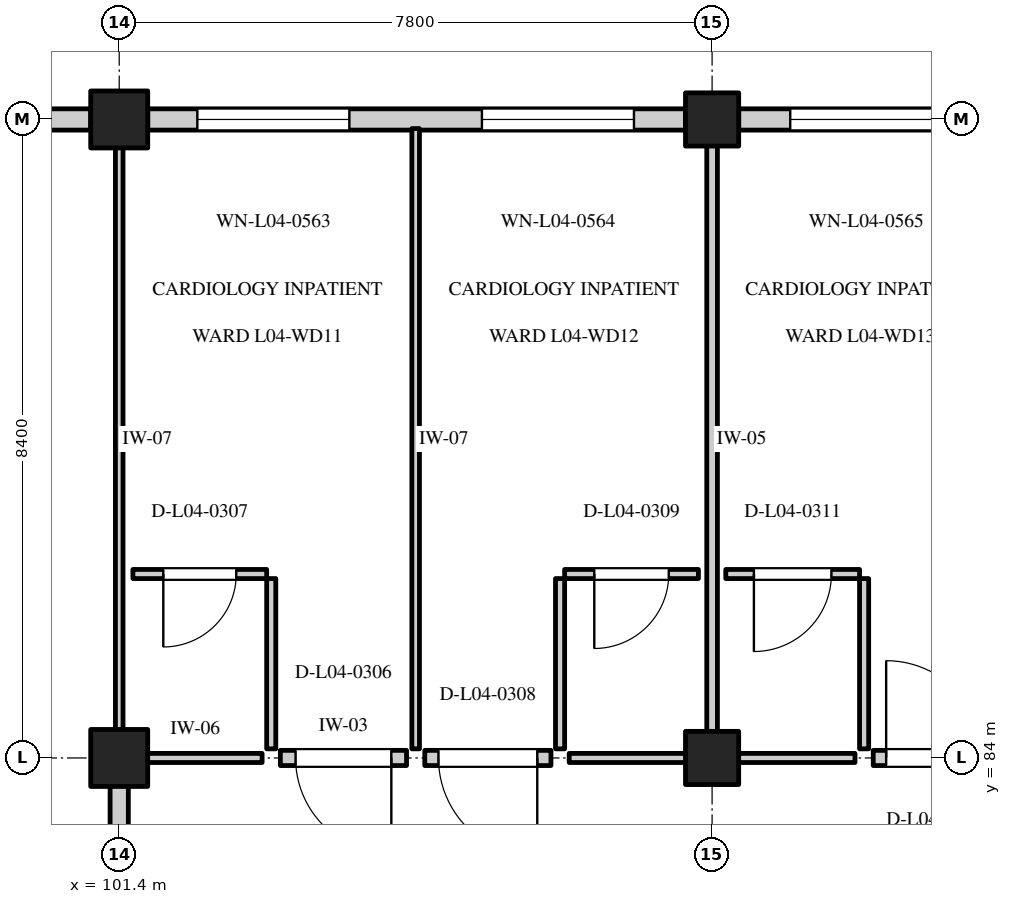
"""IFC4 building model, lengths in metres.
Left out: names, types, materials, properties, quantities, classifications, styles, units other than length and angle.
Written with IfcOpenShell. Run it as: python <this file> out.ifc"""

import sys

from ifc_helpers import new_model, si_unit, direction, frame, frame_2d, origin, origin_2d, place, context, subcontext, project, spatial, rectangle, extrude, element, fill, save


model = new_model("IFC4")
c1 = context("Model", 3, precision=1e-05, world=origin(), true_north=direction((0.0, 1.0)))
c2 = subcontext(c1, "Body", "Model", "MODEL_VIEW")
j1 = project(units=[si_unit("LENGTHUNIT", "METRE"), si_unit("PLANEANGLEUNIT", "RADIAN")], contexts=[c1])
p1 = place(None, origin())
s1 = spatial("IfcSite", under=j1, at=p1, CompositionType="ELEMENT")
p2 = place(p1, origin())
s2 = spatial("IfcBuilding", under=s1, at=p2, CompositionType="ELEMENT")
p3 = place(p2, frame((0.0, 0.0, 18.0)))
s3 = spatial("IfcBuildingStorey", under=s2, at=p3, CompositionType="ELEMENT", Elevation=18.0)
for number, where, z_axis, x_axis in (
    (1, (101.4, 84.0, 0.0), (0.0, 0.0, 1.0), (1.0, 0.0, 0.0)),
    (2, (101.4, 92.4, 0.0), (0.0, 0.0, 1.0), (1.0, 0.0, 0.0)),
):
    element("IfcColumn", number, at=place(p3, frame(where, z_axis=z_axis, x_axis=x_axis)), inside=s3, PredefinedType="COLUMN", context=c2, shape_type="SweptSolid", body=[
        extrude(rectangle(XDim=0.75, YDim=0.75, at=origin_2d()), origin(), (0.0, 0.0, 1.0), 4.2),
    ])
for number, where, z_axis, x_axis in (
    (3, (109.2, 84.0, 0.0), (0.0, 0.0, 1.0), (1.0, 0.0, 0.0)),
    (4, (109.2, 92.4, 0.0), (0.0, 0.0, 1.0), (1.0, 0.0, 0.0)),
):
    element("IfcColumn", number, at=place(p3, frame(where, z_axis=z_axis, x_axis=x_axis)), inside=s3, PredefinedType="COLUMN", context=c2, shape_type="SweptSolid", body=[
        extrude(rectangle(XDim=0.7, YDim=0.7, at=origin_2d()), origin(), (0.0, 0.0, 1.0), 4.2),
    ])
p4 = place(p3, frame((93.95, 92.4, 0.0), z_axis=(0.0, 0.0, 1.0), x_axis=(1.0, 0.0, 0.0)))
e5 = element("IfcWall", 5, at=p4, inside=s3, PredefinedType="STANDARD", context=c2, shape_type="SweptSolid", body=[
    extrude(rectangle(XDim=7.075, YDim=0.28, at=frame_2d((3.538, 0.0))), origin(), (0.0, 0.0, 1.0), 3.335),
])
p5 = place(p4, frame((0.678, 0.0, 0.8)))
e6 = element("IfcOpeningElement", 6, at=p5, cuts=e5, PredefinedType="OPENING", context=c2, shape_type="SweptSolid", body=[
    extrude(rectangle(XDim=2.0, YDim=1.75, at=frame_2d((1.0, 0.875))), frame((0.0, 0.152, 0.0), z_axis=(0.0, -1.0, 0.0), x_axis=(1.0, 0.0, 0.0)), (0.0, 0.0, 1.0), 0.304),
])
p6 = place(p4, frame((4.422, 0.0, 0.8)))
e7 = element("IfcOpeningElement", 7, at=p6, cuts=e5, PredefinedType="OPENING", context=c2, shape_type="SweptSolid", body=[
    extrude(rectangle(XDim=2.0, YDim=1.75, at=frame_2d((1.0, 0.875))), frame((0.0, 0.152, 0.0), z_axis=(0.0, -1.0, 0.0), x_axis=(1.0, 0.0, 0.0)), (0.0, 0.0, 1.0), 0.304),
])
p7 = place(p3, frame((101.775, 92.4, 0.0), z_axis=(0.0, 0.0, 1.0), x_axis=(1.0, 0.0, 0.0)))
e8 = element("IfcWall", 8, at=p7, inside=s3, PredefinedType="STANDARD", context=c2, shape_type="SweptSolid", body=[
    extrude(rectangle(XDim=7.075, YDim=0.28, at=frame_2d((3.538, 0.0))), origin(), (0.0, 0.0, 1.0), 3.335),
])
p8 = place(p7, frame((0.653, 0.0, 0.8)))
e9 = element("IfcOpeningElement", 9, at=p8, cuts=e8, PredefinedType="OPENING", context=c2, shape_type="SweptSolid", body=[
    extrude(rectangle(XDim=2.0, YDim=1.65, at=frame_2d((1.0, 0.825))), frame((0.0, 0.152, 0.0), z_axis=(0.0, -1.0, 0.0), x_axis=(1.0, 0.0, 0.0)), (0.0, 0.0, 1.0), 0.304),
])
p9 = place(p7, frame((4.397, 0.0, 0.8)))
e10 = element("IfcOpeningElement", 10, at=p9, cuts=e8, PredefinedType="OPENING", context=c2, shape_type="SweptSolid", body=[
    extrude(rectangle(XDim=2.0, YDim=1.65, at=frame_2d((1.0, 0.825))), frame((0.0, 0.152, 0.0), z_axis=(0.0, -1.0, 0.0), x_axis=(1.0, 0.0, 0.0)), (0.0, 0.0, 1.0), 0.304),
])
p10 = place(p3, frame((109.55, 92.4, 0.0), z_axis=(0.0, 0.0, 1.0), x_axis=(1.0, 0.0, 0.0)))
e11 = element("IfcWall", 11, at=p10, inside=s3, PredefinedType="STANDARD", context=c2, shape_type="SweptSolid", body=[
    extrude(rectangle(XDim=7.1, YDim=0.28, at=frame_2d((3.55, 0.0))), origin(), (0.0, 0.0, 1.0), 3.335),
])
p11 = place(p10, frame((0.678, 0.0, 0.8)))
e12 = element("IfcOpeningElement", 12, at=p11, cuts=e11, PredefinedType="OPENING", context=c2, shape_type="SweptSolid", body=[
    extrude(rectangle(XDim=2.0, YDim=1.55, at=frame_2d((1.0, 0.775))), frame((0.0, 0.152, 0.0), z_axis=(0.0, -1.0, 0.0), x_axis=(1.0, 0.0, 0.0)), (0.0, 0.0, 1.0), 0.304),
])
p12 = place(p10, frame((4.422, 0.0, 0.8)))
e13 = element("IfcOpeningElement", 13, at=p12, cuts=e11, PredefinedType="OPENING", context=c2, shape_type="SweptSolid", body=[
    extrude(rectangle(XDim=2.0, YDim=1.55, at=frame_2d((1.0, 0.775))), frame((0.0, 0.152, 0.0), z_axis=(0.0, -1.0, 0.0), x_axis=(1.0, 0.0, 0.0)), (0.0, 0.0, 1.0), 0.304),
])
p13 = place(p3, frame((101.4, 84.12, 0.0), z_axis=(0.0, 0.0, 1.0), x_axis=(0.0, 1.0, 0.0)))
e14 = element("IfcWall", 14, at=p13, inside=s3, PredefinedType="PARTITIONING", context=c2, shape_type="SweptSolid", body=[
    extrude(rectangle(XDim=8.16, YDim=0.1, at=frame_2d((4.08, 0.0))), origin(), (0.0, 0.0, 1.0), 3.235),
])
p14 = place(p3, frame((105.3, 84.12, 0.0), z_axis=(0.0, 0.0, 1.0), x_axis=(0.0, 1.0, 0.0)))
e15 = element("IfcWall", 15, at=p14, inside=s3, PredefinedType="PARTITIONING", context=c2, shape_type="SweptSolid", body=[
    extrude(rectangle(XDim=8.16, YDim=0.1, at=frame_2d((4.08, 0.0))), origin(), (0.0, 0.0, 1.0), 3.865),
])
p15 = place(p3, frame((103.52, 84.0, 0.0), z_axis=(0.0, 0.0, 1.0), x_axis=(1.0, 0.0, 0.0)))
e16 = element("IfcWall", 16, at=p15, inside=s3, PredefinedType="STANDARD", context=c2, shape_type="SweptSolid", body=[
    extrude(rectangle(XDim=1.66, YDim=0.2, at=frame_2d((0.83, 0.0))), origin(), (0.0, 0.0, 1.0), 3.235),
])
p16 = place(p15, frame((0.2, 0.0, 0.0)))
e17 = element("IfcOpeningElement", 17, at=p16, cuts=e16, PredefinedType="OPENING", context=c2, shape_type="SweptSolid", body=[
    extrude(rectangle(XDim=1.26, YDim=2.1, at=frame_2d((0.63, 1.05))), frame((0.0, 0.112, 0.0), z_axis=(0.0, -1.0, 0.0), x_axis=(1.0, 0.0, 0.0)), (0.0, 0.0, 1.0), 0.224),
])
p17 = place(p3, frame((101.52, 84.0, 0.0), z_axis=(0.0, 0.0, 1.0), x_axis=(1.0, 0.0, 0.0)))
e18 = element("IfcWall", 18, at=p17, inside=s3, PredefinedType="PARTITIONING", context=c2, shape_type="SweptSolid", body=[
    extrude(rectangle(XDim=1.76, YDim=0.12, at=frame_2d((0.88, 0.0))), origin(), (0.0, 0.0, 1.0), 3.235),
])
p18 = place(p3, frame((103.4, 84.12, 0.0), z_axis=(0.0, 0.0, 1.0), x_axis=(0.0, 1.0, 0.0)))
e19 = element("IfcWall", 19, at=p18, inside=s3, PredefinedType="PARTITIONING", context=c2, shape_type="SweptSolid", body=[
    extrude(rectangle(XDim=2.24, YDim=0.12, at=frame_2d((1.12, 0.0))), origin(), (0.0, 0.0, 1.0), 3.865),
])
p19 = place(p3, frame((101.58, 86.42, 0.0), z_axis=(0.0, 0.0, 1.0), x_axis=(1.0, 0.0, 0.0)))
e20 = element("IfcWall", 20, at=p19, inside=s3, PredefinedType="PARTITIONING", context=c2, shape_type="SweptSolid", body=[
    extrude(rectangle(XDim=1.76, YDim=0.12, at=frame_2d((0.88, 0.0))), origin(), (0.0, 0.0, 1.0), 3.865),
])
p20 = place(p19, frame((0.4, 0.0, 0.0)))
e21 = element("IfcOpeningElement", 21, at=p20, cuts=e20, PredefinedType="OPENING", context=c2, shape_type="SweptSolid", body=[
    extrude(rectangle(XDim=0.96, YDim=2.12, at=frame_2d((0.48, 1.06))), frame((0.0, 0.072, 0.0), z_axis=(0.0, -1.0, 0.0), x_axis=(1.0, 0.0, 0.0)), (0.0, 0.0, 1.0), 0.144),
])
p21 = place(p3, frame((109.2, 84.12, 0.0), z_axis=(0.0, 0.0, 1.0), x_axis=(0.0, 1.0, 0.0)))
e22 = element("IfcWall", 22, at=p21, inside=s3, PredefinedType="PARTITIONING", context=c2, shape_type="SweptSolid", body=[
    extrude(rectangle(XDim=8.16, YDim=0.14, at=frame_2d((4.08, 0.0))), origin(), (0.0, 0.0, 1.0), 3.865),
])
p22 = place(p3, frame((105.42, 84.0, 0.0), z_axis=(0.0, 0.0, 1.0), x_axis=(1.0, 0.0, 0.0)))
e23 = element("IfcWall", 23, at=p22, inside=s3, PredefinedType="STANDARD", context=c2, shape_type="SweptSolid", body=[
    extrude(rectangle(XDim=1.66, YDim=0.2, at=frame_2d((0.83, 0.0))), origin(), (0.0, 0.0, 1.0), 3.235),
])
p23 = place(p22, frame((0.18, 0.0, 0.0)))
e24 = element("IfcOpeningElement", 24, at=p23, cuts=e23, PredefinedType="OPENING", context=c2, shape_type="SweptSolid", body=[
    extrude(rectangle(XDim=1.3, YDim=2.15, at=frame_2d((0.65, 1.075))), frame((0.0, 0.112, 0.0), z_axis=(0.0, -1.0, 0.0), x_axis=(1.0, 0.0, 0.0)), (0.0, 0.0, 1.0), 0.224),
])
p24 = place(p3, frame((107.32, 84.0, 0.0), z_axis=(0.0, 0.0, 1.0), x_axis=(1.0, 0.0, 0.0)))
e25 = element("IfcWall", 25, at=p24, inside=s3, PredefinedType="PARTITIONING", context=c2, shape_type="SweptSolid", body=[
    extrude(rectangle(XDim=1.76, YDim=0.12, at=frame_2d((0.88, 0.0))), origin(), (0.0, 0.0, 1.0), 3.235),
])
p25 = place(p3, frame((107.2, 84.12, 0.0), z_axis=(0.0, 0.0, 1.0), x_axis=(0.0, 1.0, 0.0)))
e26 = element("IfcWall", 26, at=p25, inside=s3, PredefinedType="PARTITIONING", context=c2, shape_type="SweptSolid", body=[
    extrude(rectangle(XDim=2.24, YDim=0.12, at=frame_2d((1.12, 0.0))), origin(), (0.0, 0.0, 1.0), 3.865),
])
p26 = place(p3, frame((107.26, 86.42, 0.0), z_axis=(0.0, 0.0, 1.0), x_axis=(1.0, 0.0, 0.0)))
e27 = element("IfcWall", 27, at=p26, inside=s3, PredefinedType="PARTITIONING", context=c2, shape_type="SweptSolid", body=[
    extrude(rectangle(XDim=1.76, YDim=0.12, at=frame_2d((0.88, 0.0))), origin(), (0.0, 0.0, 1.0), 3.865),
])
p27 = place(p26, frame((0.39, 0.0, 0.0)))
e28 = element("IfcOpeningElement", 28, at=p27, cuts=e27, PredefinedType="OPENING", context=c2, shape_type="SweptSolid", body=[
    extrude(rectangle(XDim=0.98, YDim=2.1, at=frame_2d((0.49, 1.05))), frame((0.0, 0.072, 0.0), z_axis=(0.0, -1.0, 0.0), x_axis=(1.0, 0.0, 0.0)), (0.0, 0.0, 1.0), 0.144),
])
p28 = place(p3, frame((111.32, 84.0, 0.0), z_axis=(0.0, 0.0, 1.0), x_axis=(1.0, 0.0, 0.0)))
e29 = element("IfcWall", 29, at=p28, inside=s3, PredefinedType="STANDARD", context=c2, shape_type="SweptSolid", body=[
    extrude(rectangle(XDim=1.66, YDim=0.2, at=frame_2d((0.83, 0.0))), origin(), (0.0, 0.0, 1.0), 3.235),
])
p29 = place(p28, frame((0.17, 0.0, 0.0)))
e30 = element("IfcOpeningElement", 30, at=p29, cuts=e29, PredefinedType="OPENING", context=c2, shape_type="SweptSolid", body=[
    extrude(rectangle(XDim=1.28, YDim=2.15, at=frame_2d((0.64, 1.075))), frame((0.0, 0.112, 0.0), z_axis=(0.0, -1.0, 0.0), x_axis=(1.0, 0.0, 0.0)), (0.0, 0.0, 1.0), 0.224),
])
p30 = place(p3, frame((109.32, 84.0, 0.0), z_axis=(0.0, 0.0, 1.0), x_axis=(1.0, 0.0, 0.0)))
e31 = element("IfcWall", 31, at=p30, inside=s3, PredefinedType="PARTITIONING", context=c2, shape_type="SweptSolid", body=[
    extrude(rectangle(XDim=1.76, YDim=0.12, at=frame_2d((0.88, 0.0))), origin(), (0.0, 0.0, 1.0), 3.235),
])
p31 = place(p3, frame((111.2, 84.12, 0.0), z_axis=(0.0, 0.0, 1.0), x_axis=(0.0, 1.0, 0.0)))
e32 = element("IfcWall", 32, at=p31, inside=s3, PredefinedType="PARTITIONING", context=c2, shape_type="SweptSolid", body=[
    extrude(rectangle(XDim=2.24, YDim=0.12, at=frame_2d((1.12, 0.0))), origin(), (0.0, 0.0, 1.0), 3.865),
])
p32 = place(p3, frame((109.38, 86.42, 0.0), z_axis=(0.0, 0.0, 1.0), x_axis=(1.0, 0.0, 0.0)))
e33 = element("IfcWall", 33, at=p32, inside=s3, PredefinedType="PARTITIONING", context=c2, shape_type="SweptSolid", body=[
    extrude(rectangle(XDim=1.76, YDim=0.12, at=frame_2d((0.88, 0.0))), origin(), (0.0, 0.0, 1.0), 3.865),
])
p33 = place(p32, frame((0.37, 0.0, 0.0)))
e34 = element("IfcOpeningElement", 34, at=p33, cuts=e33, PredefinedType="OPENING", context=c2, shape_type="SweptSolid", body=[
    extrude(rectangle(XDim=1.02, YDim=2.15, at=frame_2d((0.51, 1.075))), frame((0.0, 0.072, 0.0), z_axis=(0.0, -1.0, 0.0), x_axis=(1.0, 0.0, 0.0)), (0.0, 0.0, 1.0), 0.144),
])
p34 = place(p3, frame((101.4, 81.91, 0.0), z_axis=(0.0, 0.0, 1.0), x_axis=(0.0, 1.0, 0.0)))
e35 = element("IfcWall", 35, at=p34, inside=s3, PredefinedType="STANDARD", context=c2, shape_type="SweptSolid", body=[
    extrude(rectangle(XDim=2.17, YDim=0.24, at=frame_2d((1.085, 0.0))), origin(), (0.0, 0.0, 1.0), 3.235),
])
p35 = place(p8, origin())
e36 = element("IfcWindow", 36, at=p35, inside=s3, PartitioningType="DOUBLE_PANEL_VERTICAL", PredefinedType="WINDOW", context=c2, shape_type="SweptSolid", body=[
    extrude(rectangle(XDim=2.0, YDim=1.65, at=frame_2d((1.0, 0.825))), frame((0.0, 0.03, 0.0), z_axis=(0.0, -1.0, 0.0), x_axis=(1.0, 0.0, 0.0)), (0.0, 0.0, 1.0), 0.06),
])
fill(e9, e36)
p36 = place(p9, origin())
e37 = element("IfcWindow", 37, at=p36, inside=s3, PartitioningType="DOUBLE_PANEL_VERTICAL", PredefinedType="WINDOW", context=c2, shape_type="SweptSolid", body=[
    extrude(rectangle(XDim=2.0, YDim=1.65, at=frame_2d((1.0, 0.825))), frame((0.0, 0.03, 0.0), z_axis=(0.0, -1.0, 0.0), x_axis=(1.0, 0.0, 0.0)), (0.0, 0.0, 1.0), 0.06),
])
fill(e10, e37)
p37 = place(p11, origin())
e38 = element("IfcWindow", 38, at=p37, inside=s3, PartitioningType="DOUBLE_PANEL_VERTICAL", PredefinedType="WINDOW", context=c2, shape_type="SweptSolid", body=[
    extrude(rectangle(XDim=2.0, YDim=1.55, at=frame_2d((1.0, 0.775))), frame((0.0, 0.03, 0.0), z_axis=(0.0, -1.0, 0.0), x_axis=(1.0, 0.0, 0.0)), (0.0, 0.0, 1.0), 0.06),
])
fill(e12, e38)
p38 = place(p16, origin())
e39 = element("IfcDoor", 39, at=p38, inside=s3, OperationType="SINGLE_SWING_RIGHT", PredefinedType="DOOR", context=c2, shape_type="SweptSolid", body=[
    extrude(rectangle(XDim=1.26, YDim=2.1, at=frame_2d((0.63, 1.05))), frame((0.0, 0.025, 0.0), z_axis=(0.0, -1.0, 0.0), x_axis=(1.0, 0.0, 0.0)), (0.0, 0.0, 1.0), 0.05),
])
fill(e17, e39)
p39 = place(p20, frame((0.96, 0.0, 0.0), z_axis=(0.0, 0.0, 1.0), x_axis=(-1.0, 0.0, 0.0)))
e40 = element("IfcDoor", 40, at=p39, inside=s3, OperationType="SINGLE_SWING_RIGHT", PredefinedType="DOOR", context=c2, shape_type="SweptSolid", body=[
    extrude(rectangle(XDim=0.96, YDim=2.12, at=frame_2d((0.48, 1.06))), frame((0.0, 0.025, 0.0), z_axis=(0.0, -1.0, 0.0), x_axis=(1.0, 0.0, 0.0)), (0.0, 0.0, 1.0), 0.05),
])
fill(e21, e40)
p40 = place(p23, origin())
e41 = element("IfcDoor", 41, at=p40, inside=s3, OperationType="SINGLE_SWING_RIGHT", PredefinedType="DOOR", context=c2, shape_type="SweptSolid", body=[
    extrude(rectangle(XDim=1.3, YDim=2.15, at=frame_2d((0.65, 1.075))), frame((0.0, 0.025, 0.0), z_axis=(0.0, -1.0, 0.0), x_axis=(1.0, 0.0, 0.0)), (0.0, 0.0, 1.0), 0.05),
])
fill(e24, e41)
p41 = place(p27, frame((0.98, 0.0, 0.0), z_axis=(0.0, 0.0, 1.0), x_axis=(-1.0, 0.0, 0.0)))
e42 = element("IfcDoor", 42, at=p41, inside=s3, OperationType="SINGLE_SWING_RIGHT", PredefinedType="DOOR", context=c2, shape_type="SweptSolid", body=[
    extrude(rectangle(XDim=0.98, YDim=2.1, at=frame_2d((0.49, 1.05))), frame((0.0, 0.025, 0.0), z_axis=(0.0, -1.0, 0.0), x_axis=(1.0, 0.0, 0.0)), (0.0, 0.0, 1.0), 0.05),
])
fill(e28, e42)
p42 = place(p29, origin())
e43 = element("IfcDoor", 43, at=p42, inside=s3, OperationType="SINGLE_SWING_LEFT", PredefinedType="DOOR", context=c2, shape_type="SweptSolid", body=[
    extrude(rectangle(XDim=1.28, YDim=2.15, at=frame_2d((0.64, 1.075))), frame((0.0, 0.025, 0.0), z_axis=(0.0, -1.0, 0.0), x_axis=(1.0, 0.0, 0.0)), (0.0, 0.0, 1.0), 0.05),
])
fill(e30, e43)
p43 = place(p33, frame((1.02, 0.0, 0.0), z_axis=(0.0, 0.0, 1.0), x_axis=(-1.0, 0.0, 0.0)))
e44 = element("IfcDoor", 44, at=p43, inside=s3, OperationType="SINGLE_SWING_RIGHT", PredefinedType="DOOR", context=c2, shape_type="SweptSolid", body=[
    extrude(rectangle(XDim=1.02, YDim=2.15, at=frame_2d((0.51, 1.075))), frame((0.0, 0.025, 0.0), z_axis=(0.0, -1.0, 0.0), x_axis=(1.0, 0.0, 0.0)), (0.0, 0.0, 1.0), 0.05),
])
fill(e34, e44)
save(model, sys.argv[1])
